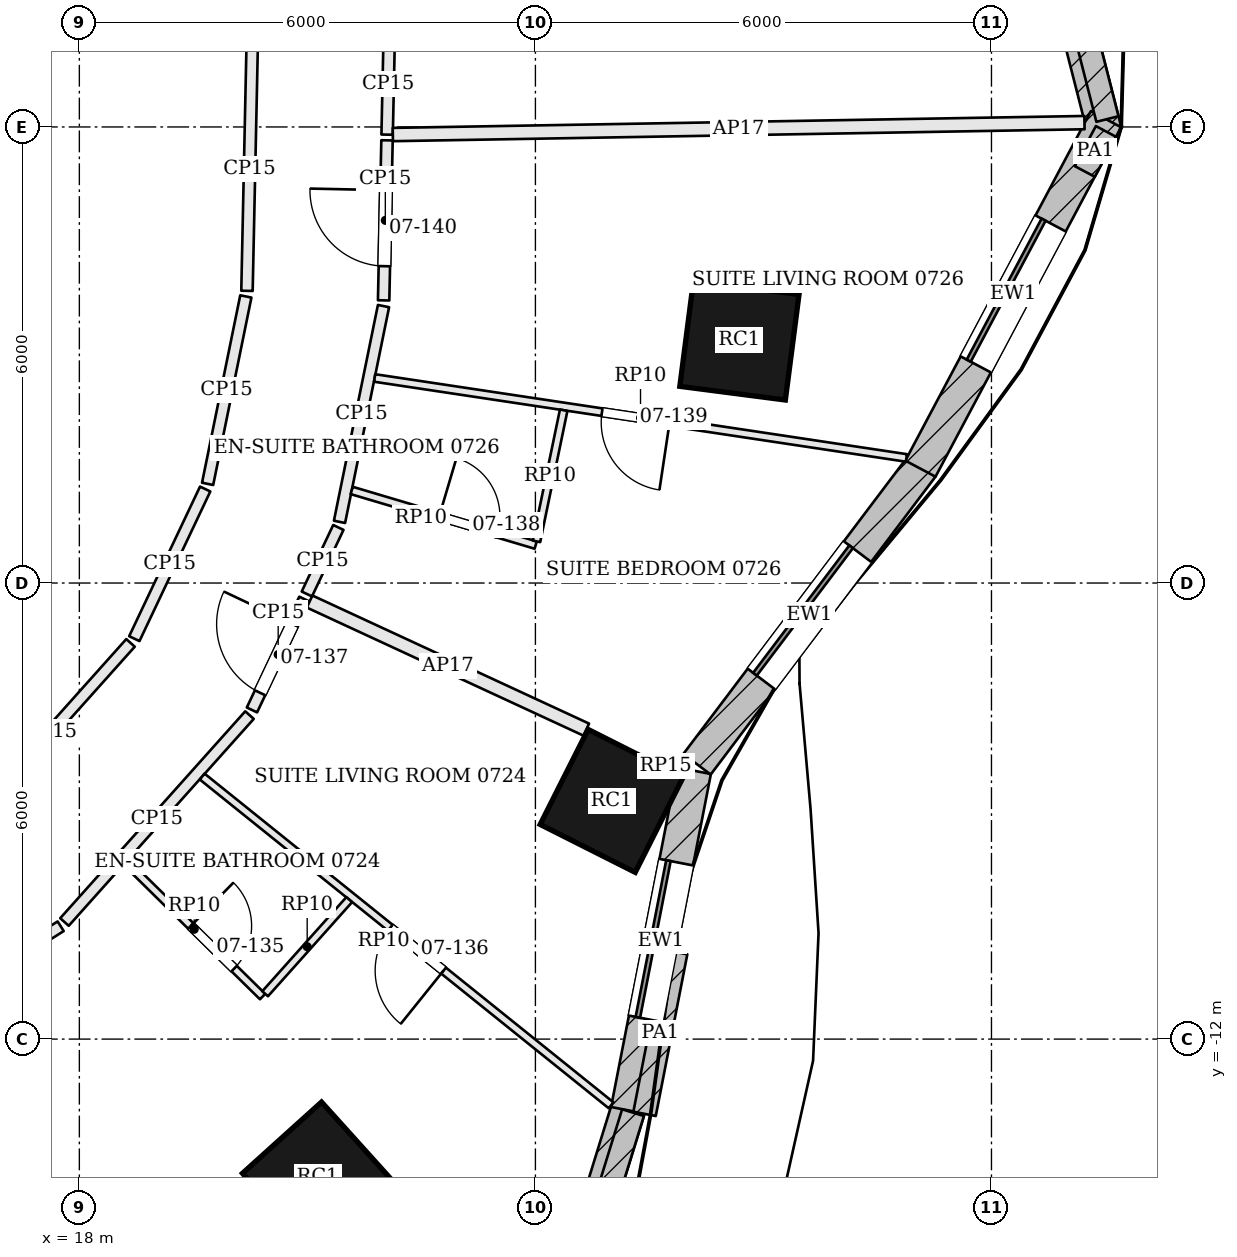
"""IFC4 building model, lengths in metres.
Left out: names, types, materials, properties, quantities, classifications, styles, units other than length and angle.
Written with IfcOpenShell. Run it as: python <this file> out.ifc"""

import sys

from ifc_helpers import new_model, si_unit, direction, frame, frame_2d, origin, origin_2d, place, context, subcontext, project, spatial, rectangle, extrude, element, fill, save


model = new_model("IFC4")
c1 = context("Model", 3, precision=1e-05, world=origin(), true_north=direction((0.0, 1.0)))
c2 = subcontext(c1, "Body", "Model", "MODEL_VIEW")
j1 = project(units=[si_unit("LENGTHUNIT", "METRE"), si_unit("PLANEANGLEUNIT", "RADIAN")], contexts=[c1])
p1 = place(None, origin())
s1 = spatial("IfcSite", under=j1, at=p1, CompositionType="ELEMENT")
p2 = place(p1, origin())
s2 = spatial("IfcBuilding", under=s1, at=p2, CompositionType="ELEMENT")
p3 = place(p2, frame((0.0, 0.0, 41.1)))
s3 = spatial("IfcBuildingStorey", under=s2, at=p3, CompositionType="ELEMENT", Elevation=41.1)
for number, where, z_axis, x_axis in (
    (1, (21.135, -13.817, 0.0), (0.0, 0.0, 1.0), (0.743, 0.67, 0.0)),
    (2, (25.003, -8.866, 0.0), (0.0, 0.0, 1.0), (0.45, 0.893, 0.0)),
    (3, (26.684, -2.808, 0.0), (0.0, 0.0, 1.0), (0.128, 0.992, 0.0)),
):
    element("IfcColumn", number, at=place(p3, frame(where, z_axis=z_axis, x_axis=x_axis)), inside=s3, PredefinedType="COLUMN", context=c2, shape_type="SweptSolid", body=[
        extrude(rectangle(XDim=1.4, YDim=1.4, at=origin_2d()), origin(), (0.0, 0.0, 1.0), 3.6),
    ])
p4 = place(p3, frame((31.489, -0.056, 0.0), z_axis=(0.0, 0.0, 1.0), x_axis=(-0.247283399528, 0.968943197674, 0.0)))
e4 = element("IfcWall", 4, at=p4, inside=s3, PredefinedType="SOLIDWALL", context=c2, shape_type="SweptSolid", body=[
    extrude(rectangle(XDim=4.982, YDim=0.45, at=frame_2d((2.491, 0.0))), origin(), (0.0, 0.0, 1.0), 3.4),
])
p5 = place(p4, frame((1.441, 0.0, 0.9)))
e5 = element("IfcOpeningElement", 5, at=p5, cuts=e4, PredefinedType="OPENING", context=c2, shape_type="SweptSolid", body=[
    extrude(rectangle(XDim=2.1, YDim=2.0, at=frame_2d((1.05, 1.0))), frame((0.0, 0.235, 0.0), z_axis=(0.0, -1.0, 0.0), x_axis=(1.0, 0.0, 0.0)), (0.0, 0.0, 1.0), 0.47),
])
p6 = place(p3, frame((23.834, -17.402, 0.0), z_axis=(0.0, 0.0, 1.0), x_axis=(0.2954658114, 0.955353313855, 0.0)))
e6 = element("IfcWall", 6, at=p6, inside=s3, PredefinedType="SOLIDWALL", context=c2, shape_type="SweptSolid", body=[
    extrude(rectangle(XDim=4.698, YDim=0.45, at=frame_2d((2.349, 0.0))), origin(), (0.0, 0.0, 1.0), 3.4),
])
p7 = place(p6, frame((1.299, 0.0, 0.9)))
e7 = element("IfcOpeningElement", 7, at=p7, cuts=e6, PredefinedType="OPENING", context=c2, shape_type="SweptSolid", body=[
    extrude(rectangle(XDim=2.1, YDim=2.0, at=frame_2d((1.05, 1.0))), frame((0.0, 0.235, 0.0), z_axis=(0.0, -1.0, 0.0), x_axis=(1.0, 0.0, 0.0)), (0.0, 0.0, 1.0), 0.47),
])
p8 = place(p3, frame((25.216, -12.936, 0.0), z_axis=(0.0, 0.0, 1.0), x_axis=(0.191564556994, 0.981480015336, 0.0)))
e8 = element("IfcWall", 8, at=p8, inside=s3, PredefinedType="SOLIDWALL", context=c2, shape_type="SweptSolid", body=[
    extrude(rectangle(XDim=4.551, YDim=0.45, at=frame_2d((2.275, 0.0))), origin(), (0.0, 0.0, 1.0), 3.4),
])
p9 = place(p8, frame((1.226, 0.0, 0.9)))
e9 = element("IfcOpeningElement", 9, at=p9, cuts=e8, PredefinedType="OPENING", context=c2, shape_type="SweptSolid", body=[
    extrude(rectangle(XDim=2.1, YDim=2.0, at=frame_2d((1.05, 1.0))), frame((0.0, 0.235, 0.0), z_axis=(0.0, -1.0, 0.0), x_axis=(1.0, 0.0, 0.0)), (0.0, 0.0, 1.0), 0.47),
])
p10 = place(p3, frame((26.126, -8.384, 0.0), z_axis=(0.0, 0.0, 1.0), x_axis=(0.602408101465, 0.798188248028, 0.0)))
e10 = element("IfcWall", 10, at=p10, inside=s3, PredefinedType="SOLIDWALL", context=c2, shape_type="SweptSolid", body=[
    extrude(rectangle(XDim=4.909, YDim=0.45, at=frame_2d((2.455, 0.0))), origin(), (0.0, 0.0, 1.0), 3.4),
])
p11 = place(p10, frame((1.405, 0.0, 0.9)))
e11 = element("IfcOpeningElement", 11, at=p11, cuts=e10, PredefinedType="OPENING", context=c2, shape_type="SweptSolid", body=[
    extrude(rectangle(XDim=2.1, YDim=2.0, at=frame_2d((1.05, 1.0))), frame((0.0, 0.235, 0.0), z_axis=(0.0, -1.0, 0.0), x_axis=(1.0, 0.0, 0.0)), (0.0, 0.0, 1.0), 0.47),
])
p12 = place(p3, frame((29.065, -4.495, 0.0), z_axis=(0.0, 0.0, 1.0), x_axis=(0.469010051546, 0.883192828067, 0.0)))
e12 = element("IfcWall", 12, at=p12, inside=s3, PredefinedType="SOLIDWALL", context=c2, shape_type="SweptSolid", body=[
    extrude(rectangle(XDim=5.206, YDim=0.45, at=frame_2d((2.603, 0.0))), origin(), (0.0, 0.0, 1.0), 3.4),
])
p13 = place(p12, frame((1.553, 0.0, 0.9)))
e13 = element("IfcOpeningElement", 13, at=p13, cuts=e12, PredefinedType="OPENING", context=c2, shape_type="SweptSolid", body=[
    extrude(rectangle(XDim=2.1, YDim=2.0, at=frame_2d((1.05, 1.0))), frame((0.0, 0.235, 0.0), z_axis=(0.0, -1.0, 0.0), x_axis=(1.0, 0.0, 0.0)), (0.0, 0.0, 1.0), 0.47),
])
p14 = place(p3, frame((31.526, 0.104, 3.6), z_axis=(0.0, 0.0, 1.0), x_axis=(-0.247310993439, 0.96893615503, 0.0)))
e14 = element("IfcWall", 14, at=p14, inside=s3, PredefinedType="PARAPET", context=c2, shape_type="SweptSolid", body=[
    extrude(rectangle(XDim=4.725, YDim=0.3, at=frame_2d((2.362, 0.0))), origin(), (0.0, 0.0, 1.0), 1.1),
])
p15 = place(p3, frame((23.906, -17.425, 3.6), z_axis=(0.0, 0.0, 1.0), x_axis=(0.295431319656, 0.955363980568, 0.0)))
e15 = element("IfcWall", 15, at=p15, inside=s3, PredefinedType="PARAPET", context=c2, shape_type="SweptSolid", body=[
    extrude(rectangle(XDim=4.666, YDim=0.3, at=frame_2d((2.333, 0.0))), origin(), (0.0, 0.0, 1.0), 1.1),
])
p16 = place(p3, frame((25.436, -12.983, 3.6), z_axis=(0.0, 0.0, 1.0), x_axis=(0.191565926717, 0.981479747993, 0.0)))
e16 = element("IfcWall", 16, at=p16, inside=s3, PredefinedType="PARAPET", context=c2, shape_type="SweptSolid", body=[
    extrude(rectangle(XDim=2.168, YDim=0.3, at=frame_2d((1.084, 0.0))), origin(), (0.0, 0.0, 1.0), 1.1),
])
p17 = place(p3, frame((31.227, -0.585, 3.6), z_axis=(0.0, 0.0, 1.0), x_axis=(0.469205161074, 0.883089189619, 0.0)))
e17 = element("IfcWall", 17, at=p17, inside=s3, PredefinedType="PARAPET", context=c2, shape_type="SweptSolid", body=[
    extrude(rectangle(XDim=0.596, YDim=0.3, at=frame_2d((0.298, 0.0))), origin(), (0.0, 0.0, 1.0), 1.1),
])
p18 = place(p3, frame((22.049, -0.101, 0.0), z_axis=(0.0, 0.0, 1.0), x_axis=(0.021197940891, 0.999775298406, 0.0)))
e18 = element("IfcWall", 18, at=p18, inside=s3, PredefinedType="PARTITIONING", context=c2, shape_type="SweptSolid", body=[
    extrude(rectangle(XDim=1.336, YDim=0.15, at=frame_2d((0.668, 0.0))), origin(), (0.0, 0.0, 1.0), 2.68),
])
p19 = place(p3, frame((31.223, 0.057, 0.0), z_axis=(0.0, 0.0, 1.0), x_axis=(-0.999851671488, -0.017223095602, 0.0)))
e19 = element("IfcWall", 19, at=p19, inside=s3, PredefinedType="PARTITIONING", context=c2, shape_type="SweptSolid", body=[
    extrude(rectangle(XDim=9.101, YDim=0.175, at=frame_2d((4.55, 0.0))), origin(), (0.0, 0.0, 1.0), 2.68),
])
p20 = place(p3, frame((19.958, -19.62, 0.0), z_axis=(0.0, 0.0, 1.0), x_axis=(-0.505643381875, 0.862742586387, 0.0)))
e20 = element("IfcWall", 20, at=p20, inside=s3, PredefinedType="PARTITIONING", context=c2, shape_type="SweptSolid", body=[
    extrude(rectangle(XDim=8.808, YDim=0.175, at=frame_2d((4.404, 0.0))), origin(), (0.0, 0.0, 1.0), 2.68),
])
p21 = place(p3, frame((15.531, -11.917, 0.0), z_axis=(0.0, 0.0, 1.0), x_axis=(0.84600940038, 0.533167979598, 0.0)))
e21 = element("IfcWall", 21, at=p21, inside=s3, PredefinedType="PARTITIONING", context=c2, shape_type="SweptSolid", body=[
    extrude(rectangle(XDim=2.628, YDim=0.15, at=frame_2d((1.314, 0.0))), origin(), (0.0, 0.0, 1.0), 2.68),
])
p22 = place(p3, frame((17.804, -10.46, 0.0), z_axis=(0.0, 0.0, 1.0), x_axis=(0.666597463623, 0.745417883802, 0.0)))
e22 = element("IfcWall", 22, at=p22, inside=s3, PredefinedType="PARTITIONING", context=c2, shape_type="SweptSolid", body=[
    extrude(rectangle(XDim=3.652, YDim=0.15, at=frame_2d((1.826, 0.0))), origin(), (0.0, 0.0, 1.0), 2.68),
])
p23 = place(p3, frame((20.271, -7.67, 0.0), z_axis=(0.0, 0.0, 1.0), x_axis=(0.42804079978, 0.903759411416, 0.0)))
e23 = element("IfcWall", 23, at=p23, inside=s3, PredefinedType="PARTITIONING", context=c2, shape_type="SweptSolid", body=[
    extrude(rectangle(XDim=1.613, YDim=0.15, at=frame_2d((0.807, 0.0))), origin(), (0.0, 0.0, 1.0), 2.68),
])
p24 = place(p23, frame((0.25, 0.0, 0.0)))
e24 = element("IfcOpeningElement", 24, at=p24, cuts=e23, PredefinedType="OPENING", context=c2, shape_type="SweptSolid", body=[
    extrude(rectangle(XDim=1.0, YDim=2.1, at=frame_2d((0.5, 1.05))), frame((0.0, 0.085, 0.0), z_axis=(0.0, -1.0, 0.0), x_axis=(1.0, 0.0, 0.0)), (0.0, 0.0, 1.0), 0.17),
])
p25 = place(p3, frame((25.857, -8.479, 0.0), z_axis=(0.0, 0.0, 1.0), x_axis=(-0.90750010164, 0.420051860517, 0.0)))
e25 = element("IfcWall", 25, at=p25, inside=s3, PredefinedType="PARTITIONING", context=c2, shape_type="SweptSolid", body=[
    extrude(rectangle(XDim=0.312, YDim=0.15, at=frame_2d((0.156, 0.0))), origin(), (0.0, 0.0, 1.0), 3.4),
])
p26 = place(p3, frame((24.669, -7.929, 0.0), z_axis=(0.0, 0.0, 1.0), x_axis=(-0.907461750658, 0.420134705888, 0.0)))
e26 = element("IfcWall", 26, at=p26, inside=s3, PredefinedType="PARTITIONING", context=c2, shape_type="SweptSolid", body=[
    extrude(rectangle(XDim=4.011, YDim=0.175, at=frame_2d((2.006, 0.0))), origin(), (0.0, 0.0, 1.0), 2.68),
])
p27 = place(p3, frame((20.993, -6.144, 0.0), z_axis=(0.0, 0.0, 1.0), x_axis=(0.42784789947, 0.903850748143, 0.0)))
e27 = element("IfcWall", 27, at=p27, inside=s3, PredefinedType="PARTITIONING", context=c2, shape_type="SweptSolid", body=[
    extrude(rectangle(XDim=0.968, YDim=0.15, at=frame_2d((0.484, 0.0))), origin(), (0.0, 0.0, 1.0), 2.68),
])
p28 = place(p3, frame((21.423, -5.195, 0.0), z_axis=(0.0, 0.0, 1.0), x_axis=(0.199793264012, 0.979838074202, 0.0)))
e28 = element("IfcWall", 28, at=p28, inside=s3, PredefinedType="PARTITIONING", context=c2, shape_type="SweptSolid", body=[
    extrude(rectangle(XDim=2.897, YDim=0.15, at=frame_2d((1.449, 0.0))), origin(), (0.0, 0.0, 1.0), 2.68),
])
p29 = place(p3, frame((22.003, -2.281, 0.0), z_axis=(0.0, 0.0, 1.0), x_axis=(0.021099198105, 0.999777387141, 0.0)))
e29 = element("IfcWall", 29, at=p29, inside=s3, PredefinedType="PARTITIONING", context=c2, shape_type="SweptSolid", body=[
    extrude(rectangle(XDim=2.106, YDim=0.15, at=frame_2d((1.053, 0.0))), origin(), (0.0, 0.0, 1.0), 2.68),
])
p30 = place(p29, frame((0.45, 0.0, 0.0)))
e30 = element("IfcOpeningElement", 30, at=p30, cuts=e29, PredefinedType="OPENING", context=c2, shape_type="SweptSolid", body=[
    extrude(rectangle(XDim=1.0, YDim=2.1, at=frame_2d((0.5, 1.05))), frame((0.0, 0.085, 0.0), z_axis=(0.0, -1.0, 0.0), x_axis=(1.0, 0.0, 0.0)), (0.0, 0.0, 1.0), 0.17),
])
p31 = place(p3, frame((20.273, 1.061, 0.0), z_axis=(0.0, 0.0, 1.0), x_axis=(-0.021166906337, -0.99977595594, 0.0)))
e31 = element("IfcWall", 31, at=p31, inside=s3, PredefinedType="PARTITIONING", context=c2, shape_type="SweptSolid", body=[
    extrude(rectangle(XDim=3.218, YDim=0.15, at=frame_2d((1.609, 0.0))), origin(), (0.0, 0.0, 1.0), 2.68),
])
p32 = place(p3, frame((20.19, -2.229, 0.0), z_axis=(0.0, 0.0, 1.0), x_axis=(-0.199752828647, -0.97984631828, 0.0)))
e32 = element("IfcWall", 32, at=p32, inside=s3, PredefinedType="PARTITIONING", context=c2, shape_type="SweptSolid", body=[
    extrude(rectangle(XDim=2.517, YDim=0.15, at=frame_2d((1.258, 0.0))), origin(), (0.0, 0.0, 1.0), 2.68),
])
p33 = place(p3, frame((19.655, -4.763, 0.0), z_axis=(0.0, 0.0, 1.0), x_axis=(-0.427965880464, -0.903794891089, 0.0)))
e33 = element("IfcWall", 33, at=p33, inside=s3, PredefinedType="PARTITIONING", context=c2, shape_type="SweptSolid", body=[
    extrude(rectangle(XDim=2.178, YDim=0.15, at=frame_2d((1.089, 0.0))), origin(), (0.0, 0.0, 1.0), 2.68),
])
p34 = place(p3, frame((18.673, -6.788, 0.0), z_axis=(0.0, 0.0, 1.0), x_axis=(-0.666610670036, -0.745406073623, 0.0)))
e34 = element("IfcWall", 34, at=p34, inside=s3, PredefinedType="PARTITIONING", context=c2, shape_type="SweptSolid", body=[
    extrude(rectangle(XDim=3.139, YDim=0.15, at=frame_2d((1.569, 0.0))), origin(), (0.0, 0.0, 1.0), 2.68),
])
p35 = place(p3, frame((24.996, -12.871, 0.0), z_axis=(0.0, 0.0, 1.0), x_axis=(-0.779382782797, 0.626548065099, 0.0)))
e35 = element("IfcWall", 35, at=p35, inside=s3, PredefinedType="PARTITIONING", context=c2, shape_type="SweptSolid", body=[
    extrude(rectangle(XDim=6.902, YDim=0.1, at=frame_2d((3.451, 0.0))), origin(), (0.0, 0.0, 1.0), 2.68),
])
p36 = place(p35, frame((2.828, 0.0, 0.0)))
e36 = element("IfcOpeningElement", 36, at=p36, cuts=e35, PredefinedType="OPENING", context=c2, shape_type="SweptSolid", body=[
    extrude(rectangle(XDim=0.9, YDim=2.4, at=frame_2d((0.45, 1.2))), frame((0.0, 0.06, 0.0), z_axis=(0.0, -1.0, 0.0), x_axis=(1.0, 0.0, 0.0)), (0.0, 0.0, 1.0), 0.12),
])
p37 = place(p3, frame((18.611, -9.67, 0.0), z_axis=(0.0, 0.0, 1.0), x_axis=(0.712836736893, -0.701330012573, 0.0)))
e37 = element("IfcWall", 37, at=p37, inside=s3, PredefinedType="PARTITIONING", context=c2, shape_type="SweptSolid", body=[
    extrude(rectangle(XDim=2.525, YDim=0.1, at=frame_2d((1.262, 0.0))), origin(), (0.0, 0.0, 1.0), 2.68),
])
p38 = place(p37, frame((1.2, 0.0, 0.0)))
e38 = element("IfcOpeningElement", 38, at=p38, cuts=e37, PredefinedType="OPENING", context=c2, shape_type="SweptSolid", body=[
    extrude(rectangle(XDim=0.8, YDim=2.1, at=frame_2d((0.4, 1.05))), frame((0.0, 0.06, 0.0), z_axis=(0.0, -1.0, 0.0), x_axis=(1.0, 0.0, 0.0)), (0.0, 0.0, 1.0), 0.12),
])
p39 = place(p3, frame((20.444, -11.403, 0.0), z_axis=(0.0, 0.0, 1.0), x_axis=(0.666369249882, 0.745621903388, 0.0)))
e39 = element("IfcWall", 39, at=p39, inside=s3, PredefinedType="PARTITIONING", context=c2, shape_type="SweptSolid", body=[
    extrude(rectangle(XDim=1.66, YDim=0.1, at=frame_2d((0.83, 0.0))), origin(), (0.0, 0.0, 1.0), 2.68),
])
p40 = place(p3, frame((28.881, -4.354, 0.0), z_axis=(0.0, 0.0, 1.0), x_axis=(-0.988881100428, 0.14870833607, 0.0)))
e40 = element("IfcWall", 40, at=p40, inside=s3, PredefinedType="PARTITIONING", context=c2, shape_type="SweptSolid", body=[
    extrude(rectangle(XDim=7.074, YDim=0.1, at=frame_2d((3.537, 0.0))), origin(), (0.0, 0.0, 1.0), 2.68),
])
p41 = place(p40, frame((3.15, 0.0, 0.0)))
e41 = element("IfcOpeningElement", 41, at=p41, cuts=e40, PredefinedType="OPENING", context=c2, shape_type="SweptSolid", body=[
    extrude(rectangle(XDim=0.9, YDim=2.4, at=frame_2d((0.45, 1.2))), frame((0.0, 0.06, 0.0), z_axis=(0.0, -1.0, 0.0), x_axis=(1.0, 0.0, 0.0)), (0.0, 0.0, 1.0), 0.12),
])
p42 = place(p3, frame((21.583, -4.782, 0.0), z_axis=(0.0, 0.0, 1.0), x_axis=(0.958634088197, -0.284641326843, 0.0)))
e42 = element("IfcWall", 42, at=p42, inside=s3, PredefinedType="PARTITIONING", context=c2, shape_type="SweptSolid", body=[
    extrude(rectangle(XDim=2.525, YDim=0.1, at=frame_2d((1.263, 0.0))), origin(), (0.0, 0.0, 1.0), 2.68),
])
p43 = place(p42, frame((1.2, 0.0, 0.0)))
e43 = element("IfcOpeningElement", 43, at=p43, cuts=e42, PredefinedType="OPENING", context=c2, shape_type="SweptSolid", body=[
    extrude(rectangle(XDim=0.8, YDim=2.1, at=frame_2d((0.4, 1.05))), frame((0.0, 0.06, 0.0), z_axis=(0.0, -1.0, 0.0), x_axis=(1.0, 0.0, 0.0)), (0.0, 0.0, 1.0), 0.12),
])
p44 = place(p3, frame((24.014, -5.452, 0.0), z_axis=(0.0, 0.0, 1.0), x_axis=(0.203040963586, 0.979170244189, 0.0)))
e44 = element("IfcWall", 44, at=p44, inside=s3, PredefinedType="PARTITIONING", context=c2, shape_type="SweptSolid", body=[
    extrude(rectangle(XDim=1.761, YDim=0.1, at=frame_2d((0.881, 0.0))), origin(), (0.0, 0.0, 1.0), 2.68),
])
p45 = place(p9, origin())
e45 = element("IfcWindow", 45, at=p45, inside=s3, PartitioningType="SINGLE_PANEL", PredefinedType="WINDOW", context=c2, shape_type="SweptSolid", body=[
    extrude(rectangle(XDim=2.1, YDim=2.0, at=frame_2d((1.05, 1.0))), frame((0.0, 0.135, 0.0), z_axis=(0.0, -1.0, 0.0), x_axis=(1.0, 0.0, 0.0)), (0.0, 0.0, 1.0), 0.06),
])
fill(e9, e45)
p46 = place(p11, origin())
e46 = element("IfcWindow", 46, at=p46, inside=s3, PartitioningType="SINGLE_PANEL", PredefinedType="WINDOW", context=c2, shape_type="SweptSolid", body=[
    extrude(rectangle(XDim=2.1, YDim=2.0, at=frame_2d((1.05, 1.0))), frame((0.0, 0.135, 0.0), z_axis=(0.0, -1.0, 0.0), x_axis=(1.0, 0.0, 0.0)), (0.0, 0.0, 1.0), 0.06),
])
fill(e11, e46)
p47 = place(p13, origin())
e47 = element("IfcWindow", 47, at=p47, inside=s3, PartitioningType="SINGLE_PANEL", PredefinedType="WINDOW", context=c2, shape_type="SweptSolid", body=[
    extrude(rectangle(XDim=2.1, YDim=2.0, at=frame_2d((1.05, 1.0))), frame((0.0, 0.135, 0.0), z_axis=(0.0, -1.0, 0.0), x_axis=(1.0, 0.0, 0.0)), (0.0, 0.0, 1.0), 0.06),
])
fill(e13, e47)
p48 = place(p38, origin())
e48 = element("IfcDoor", 48, at=p48, inside=s3, OperationType="SINGLE_SWING_LEFT", PredefinedType="DOOR", context=c2, shape_type="SweptSolid", body=[
    extrude(rectangle(XDim=0.8, YDim=2.1, at=frame_2d((0.4, 1.05))), frame((0.0, 0.025, 0.0), z_axis=(0.0, -1.0, 0.0), x_axis=(1.0, 0.0, 0.0)), (0.0, 0.0, 1.0), 0.05),
])
fill(e38, e48)
p49 = place(p36, origin())
e49 = element("IfcDoor", 49, at=p49, inside=s3, OperationType="SINGLE_SWING_LEFT", PredefinedType="DOOR", context=c2, shape_type="SweptSolid", body=[
    extrude(rectangle(XDim=0.9, YDim=2.4, at=frame_2d((0.45, 1.2))), frame((0.0, 0.025, 0.0), z_axis=(0.0, -1.0, 0.0), x_axis=(1.0, 0.0, 0.0)), (0.0, 0.0, 1.0), 0.05),
])
fill(e36, e49)
p50 = place(p24, origin())
e50 = element("IfcDoor", 50, at=p50, inside=s3, OperationType="SINGLE_SWING_RIGHT", PredefinedType="DOOR", context=c2, shape_type="SweptSolid", body=[
    extrude(rectangle(XDim=1.0, YDim=2.1, at=frame_2d((0.5, 1.05))), frame((0.0, 0.025, 0.0), z_axis=(0.0, -1.0, 0.0), x_axis=(1.0, 0.0, 0.0)), (0.0, 0.0, 1.0), 0.05),
])
fill(e24, e50)
p51 = place(p43, origin())
e51 = element("IfcDoor", 51, at=p51, inside=s3, OperationType="SINGLE_SWING_LEFT", PredefinedType="DOOR", context=c2, shape_type="SweptSolid", body=[
    extrude(rectangle(XDim=0.8, YDim=2.1, at=frame_2d((0.4, 1.05))), frame((0.0, 0.025, 0.0), z_axis=(0.0, -1.0, 0.0), x_axis=(1.0, 0.0, 0.0)), (0.0, 0.0, 1.0), 0.05),
])
fill(e43, e51)
p52 = place(p41, origin())
e52 = element("IfcDoor", 52, at=p52, inside=s3, OperationType="SINGLE_SWING_LEFT", PredefinedType="DOOR", context=c2, shape_type="SweptSolid", body=[
    extrude(rectangle(XDim=0.9, YDim=2.4, at=frame_2d((0.45, 1.2))), frame((0.0, 0.025, 0.0), z_axis=(0.0, -1.0, 0.0), x_axis=(1.0, 0.0, 0.0)), (0.0, 0.0, 1.0), 0.05),
])
fill(e41, e52)
p53 = place(p30, origin())
e53 = element("IfcDoor", 53, at=p53, inside=s3, OperationType="SINGLE_SWING_RIGHT", PredefinedType="DOOR", context=c2, shape_type="SweptSolid", body=[
    extrude(rectangle(XDim=1.0, YDim=2.1, at=frame_2d((0.5, 1.05))), frame((0.0, 0.025, 0.0), z_axis=(0.0, -1.0, 0.0), x_axis=(1.0, 0.0, 0.0)), (0.0, 0.0, 1.0), 0.05),
])
fill(e30, e53)
save(model, sys.argv[1])
